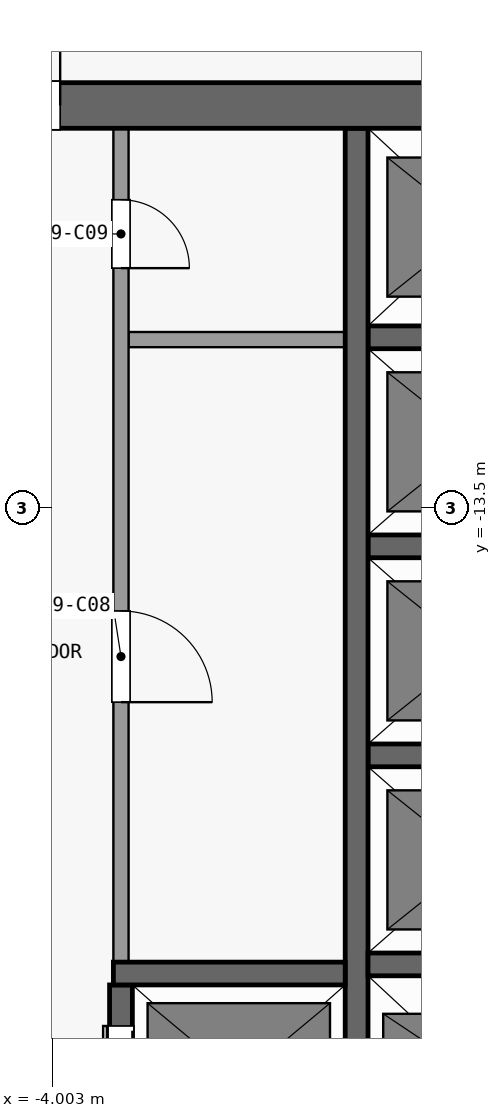
"""IFC4 building model, lengths in metres.
Left out: names, types, materials, properties, quantities, classifications, styles, units other than length and angle.
Written with IfcOpenShell. Run it as: python <this file> out.ifc"""

import sys

from ifc_helpers import new_model, si_unit, direction, frame, frame_2d, origin, place, context, subcontext, project, spatial, rectangle, extrude, element, fill, save


model = new_model("IFC4")
c1 = context("Model", 3, precision=1e-05, world=origin(), true_north=direction((0.0, 1.0)))
c2 = subcontext(c1, "Body", "Model", "MODEL_VIEW")
j1 = project(units=[si_unit("LENGTHUNIT", "METRE"), si_unit("PLANEANGLEUNIT", "RADIAN")], contexts=[c1])
p1 = place(None, origin())
s1 = spatial("IfcSite", under=j1, at=p1, CompositionType="ELEMENT")
p2 = place(p1, origin())
s2 = spatial("IfcBuilding", under=s1, at=p2, CompositionType="ELEMENT")
p3 = place(p2, frame((0.0, 0.0, 160.1)))
s3 = spatial("IfcBuildingStorey", under=s2, at=p3, CompositionType="ELEMENT", Elevation=160.1)
p4 = place(p3, frame((-13.3, -8.2, 0.0), z_axis=(0.0, 0.0, 1.0), x_axis=(1.0, 0.0, 0.0)))
e1 = element("IfcWall", 1, at=p4, inside=s3, PredefinedType="SHEAR", context=c2, shape_type="SweptSolid", body=[
    extrude(rectangle(XDim=26.6, YDim=0.6, at=frame_2d((13.3, 0.0))), origin(), (0.0, 0.0, 1.0), 3.3),
])
p5 = place(p4, frame((7.6, 0.0, 0.0)))
e2 = element("IfcOpeningElement", 2, at=p5, cuts=e1, PredefinedType="OPENING", context=c2, shape_type="SweptSolid", body=[
    extrude(rectangle(XDim=1.8, YDim=2.1, at=frame_2d((0.9, 1.05))), frame((0.0, 0.31, 0.0), z_axis=(0.0, -1.0, 0.0), x_axis=(1.0, 0.0, 0.0)), (0.0, 0.0, 1.0), 0.62),
])
p6 = place(p4, frame((17.2, 0.0, 0.0)))
e3 = element("IfcOpeningElement", 3, at=p6, cuts=e1, PredefinedType="OPENING", context=c2, shape_type="SweptSolid", body=[
    extrude(rectangle(XDim=1.8, YDim=2.1, at=frame_2d((0.9, 1.05))), frame((0.0, 0.31, 0.0), z_axis=(0.0, -1.0, 0.0), x_axis=(1.0, 0.0, 0.0)), (0.0, 0.0, 1.0), 0.62),
])
p7 = place(p4, frame((2.525, 0.0, 0.0)))
e4 = element("IfcOpeningElement", 4, at=p7, cuts=e1, PredefinedType="OPENING", context=c2, shape_type="SweptSolid", body=[
    extrude(rectangle(XDim=0.9, YDim=2.1, at=frame_2d((0.45, 1.05))), frame((0.0, 0.31, 0.0), z_axis=(0.0, -1.0, 0.0), x_axis=(1.0, 0.0, 0.0)), (0.0, 0.0, 1.0), 0.62),
])
p8 = place(p4, frame((23.875, 0.0, 0.0)))
e5 = element("IfcOpeningElement", 5, at=p8, cuts=e1, PredefinedType="OPENING", context=c2, shape_type="SweptSolid", body=[
    extrude(rectangle(XDim=1.2, YDim=2.1, at=frame_2d((0.6, 1.05))), frame((0.0, 0.31, 0.0), z_axis=(0.0, -1.0, 0.0), x_axis=(1.0, 0.0, 0.0)), (0.0, 0.0, 1.0), 0.62),
])
p9 = place(p3, frame((-3.2, -19.62, 0.0), z_axis=(0.0, 0.0, 1.0), x_axis=(1.0, 0.0, 0.0)))
e6 = element("IfcWall", 6, at=p9, inside=s3, PredefinedType="SHEAR", context=c2, shape_type="SweptSolid", body=[
    extrude(rectangle(XDim=3.05, YDim=0.3, at=frame_2d((1.525, 0.0))), origin(), (0.0, 0.0, 1.0), 3.3),
])
for number, where, z_axis, x_axis in (
    (7, (0.15, -19.5, 0.0), (0.0, 0.0, 1.0), (1.0, 0.0, 0.0)),
    (8, (0.15, -16.75, 0.0), (0.0, 0.0, 1.0), (1.0, 0.0, 0.0)),
    (9, (0.15, -14.0, 0.0), (0.0, 0.0, 1.0), (1.0, 0.0, 0.0)),
):
    element("IfcWall", number, at=place(p3, frame(where, z_axis=z_axis, x_axis=x_axis)), inside=s3, PredefinedType="SHEAR", context=c2, shape_type="SweptSolid", body=[
        extrude(rectangle(XDim=2.8, YDim=0.3, at=frame_2d((1.4, 0.0))), origin(), (0.0, 0.0, 1.0), 3.3),
    ])
p10 = place(p3, frame((-3.0, -11.28, 0.0), z_axis=(0.0, 0.0, 1.0), x_axis=(1.0, 0.0, 0.0)))
e10 = element("IfcWall", 10, at=p10, inside=s3, PredefinedType="PARTITIONING", context=c2, shape_type="SweptSolid", body=[
    extrude(rectangle(XDim=2.85, YDim=0.2, at=frame_2d((1.425, 0.0))), origin(), (0.0, 0.0, 1.0), 3.3),
])
p11 = place(p3, frame((0.15, -11.25, 0.0), z_axis=(0.0, 0.0, 1.0), x_axis=(1.0, 0.0, 0.0)))
e11 = element("IfcWall", 11, at=p11, inside=s3, PredefinedType="SHEAR", context=c2, shape_type="SweptSolid", body=[
    extrude(rectangle(XDim=2.8, YDim=0.3, at=frame_2d((1.4, 0.0))), origin(), (0.0, 0.0, 1.0), 3.3),
])
p12 = place(p3, frame((-3.1, -22.25, 0.0), z_axis=(0.0, 0.0, 1.0), x_axis=(0.0, 1.0, 0.0)))
e12 = element("IfcWall", 12, at=p12, inside=s3, PredefinedType="SHEAR", context=c2, shape_type="SweptSolid", body=[
    extrude(rectangle(XDim=2.48, YDim=0.3, at=frame_2d((1.24, 0.0))), origin(), (0.0, 0.0, 1.0), 3.3),
])
p13 = place(p12, frame((0.54, 0.0, 0.0)))
e13 = element("IfcOpeningElement", 13, at=p13, cuts=e12, PredefinedType="OPENING", context=c2, shape_type="SweptSolid", body=[
    extrude(rectangle(XDim=1.4, YDim=2.1, at=frame_2d((0.7, 1.05))), frame((0.0, 0.16, 0.0), z_axis=(0.0, -1.0, 0.0), x_axis=(1.0, 0.0, 0.0)), (0.0, 0.0, 1.0), 0.32),
])
p14 = place(p3, frame((-3.1, -8.5, 0.0), z_axis=(0.0, 0.0, 1.0), x_axis=(0.0, -1.0, 0.0)))
e14 = element("IfcWall", 14, at=p14, inside=s3, PredefinedType="PARTITIONING", context=c2, shape_type="SweptSolid", body=[
    extrude(rectangle(XDim=10.97, YDim=0.2, at=frame_2d((5.485, 0.0))), origin(), (0.0, 0.0, 1.0), 3.3),
])
p15 = place(p14, frame((6.35, 0.0, 0.0)))
e15 = element("IfcOpeningElement", 15, at=p15, cuts=e14, PredefinedType="OPENING", context=c2, shape_type="SweptSolid", body=[
    extrude(rectangle(XDim=1.2, YDim=2.1, at=frame_2d((0.6, 1.05))), frame((0.0, 0.11, 0.0), z_axis=(0.0, -1.0, 0.0), x_axis=(1.0, 0.0, 0.0)), (0.0, 0.0, 1.0), 0.22),
])
p16 = place(p14, frame((0.94, 0.0, 0.0)))
e16 = element("IfcOpeningElement", 16, at=p16, cuts=e14, PredefinedType="OPENING", context=c2, shape_type="SweptSolid", body=[
    extrude(rectangle(XDim=0.9, YDim=2.1, at=frame_2d((0.45, 1.05))), frame((0.0, 0.11, 0.0), z_axis=(0.0, -1.0, 0.0), x_axis=(1.0, 0.0, 0.0)), (0.0, 0.0, 1.0), 0.22),
])
p17 = place(p3, frame((0.0, -22.25, 0.0), z_axis=(0.0, 0.0, 1.0), x_axis=(0.0, 1.0, 0.0)))
e17 = element("IfcWall", 17, at=p17, inside=s3, PredefinedType="SHEAR", context=c2, shape_type="SweptSolid", body=[
    extrude(rectangle(XDim=13.75, YDim=0.3, at=frame_2d((6.875, 0.0))), origin(), (0.0, 0.0, 1.0), 3.3),
])
p18 = place(p13, origin())
e18 = element("IfcDoor", 18, at=p18, inside=s3, OperationType="DOUBLE_DOOR_SLIDING", PredefinedType="DOOR", context=c2, shape_type="SweptSolid", body=[
    extrude(rectangle(XDim=1.4, YDim=2.1, at=frame_2d((0.7, 1.05))), frame((0.0, 0.025, 0.0), z_axis=(0.0, -1.0, 0.0), x_axis=(1.0, 0.0, 0.0)), (0.0, 0.0, 1.0), 0.05),
])
fill(e13, e18)
p19 = place(p5, origin())
e19 = element("IfcDoor", 19, at=p19, inside=s3, OperationType="DOUBLE_DOOR_SINGLE_SWING", PredefinedType="DOOR", context=c2, shape_type="SweptSolid", body=[
    extrude(rectangle(XDim=1.8, YDim=2.1, at=frame_2d((0.9, 1.05))), frame((0.0, 0.025, 0.0), z_axis=(0.0, -1.0, 0.0), x_axis=(1.0, 0.0, 0.0)), (0.0, 0.0, 1.0), 0.05),
])
fill(e2, e19)
p20 = place(p15, origin())
e20 = element("IfcDoor", 20, at=p20, inside=s3, OperationType="SINGLE_SWING_RIGHT", PredefinedType="DOOR", context=c2, shape_type="SweptSolid", body=[
    extrude(rectangle(XDim=1.2, YDim=2.1, at=frame_2d((0.6, 1.05))), frame((0.0, 0.025, 0.0), z_axis=(0.0, -1.0, 0.0), x_axis=(1.0, 0.0, 0.0)), (0.0, 0.0, 1.0), 0.05),
])
fill(e15, e20)
p21 = place(p16, origin())
e21 = element("IfcDoor", 21, at=p21, inside=s3, OperationType="SINGLE_SWING_RIGHT", PredefinedType="DOOR", context=c2, shape_type="SweptSolid", body=[
    extrude(rectangle(XDim=0.9, YDim=2.1, at=frame_2d((0.45, 1.05))), frame((0.0, 0.025, 0.0), z_axis=(0.0, -1.0, 0.0), x_axis=(1.0, 0.0, 0.0)), (0.0, 0.0, 1.0), 0.05),
])
fill(e16, e21)
save(model, sys.argv[1])
